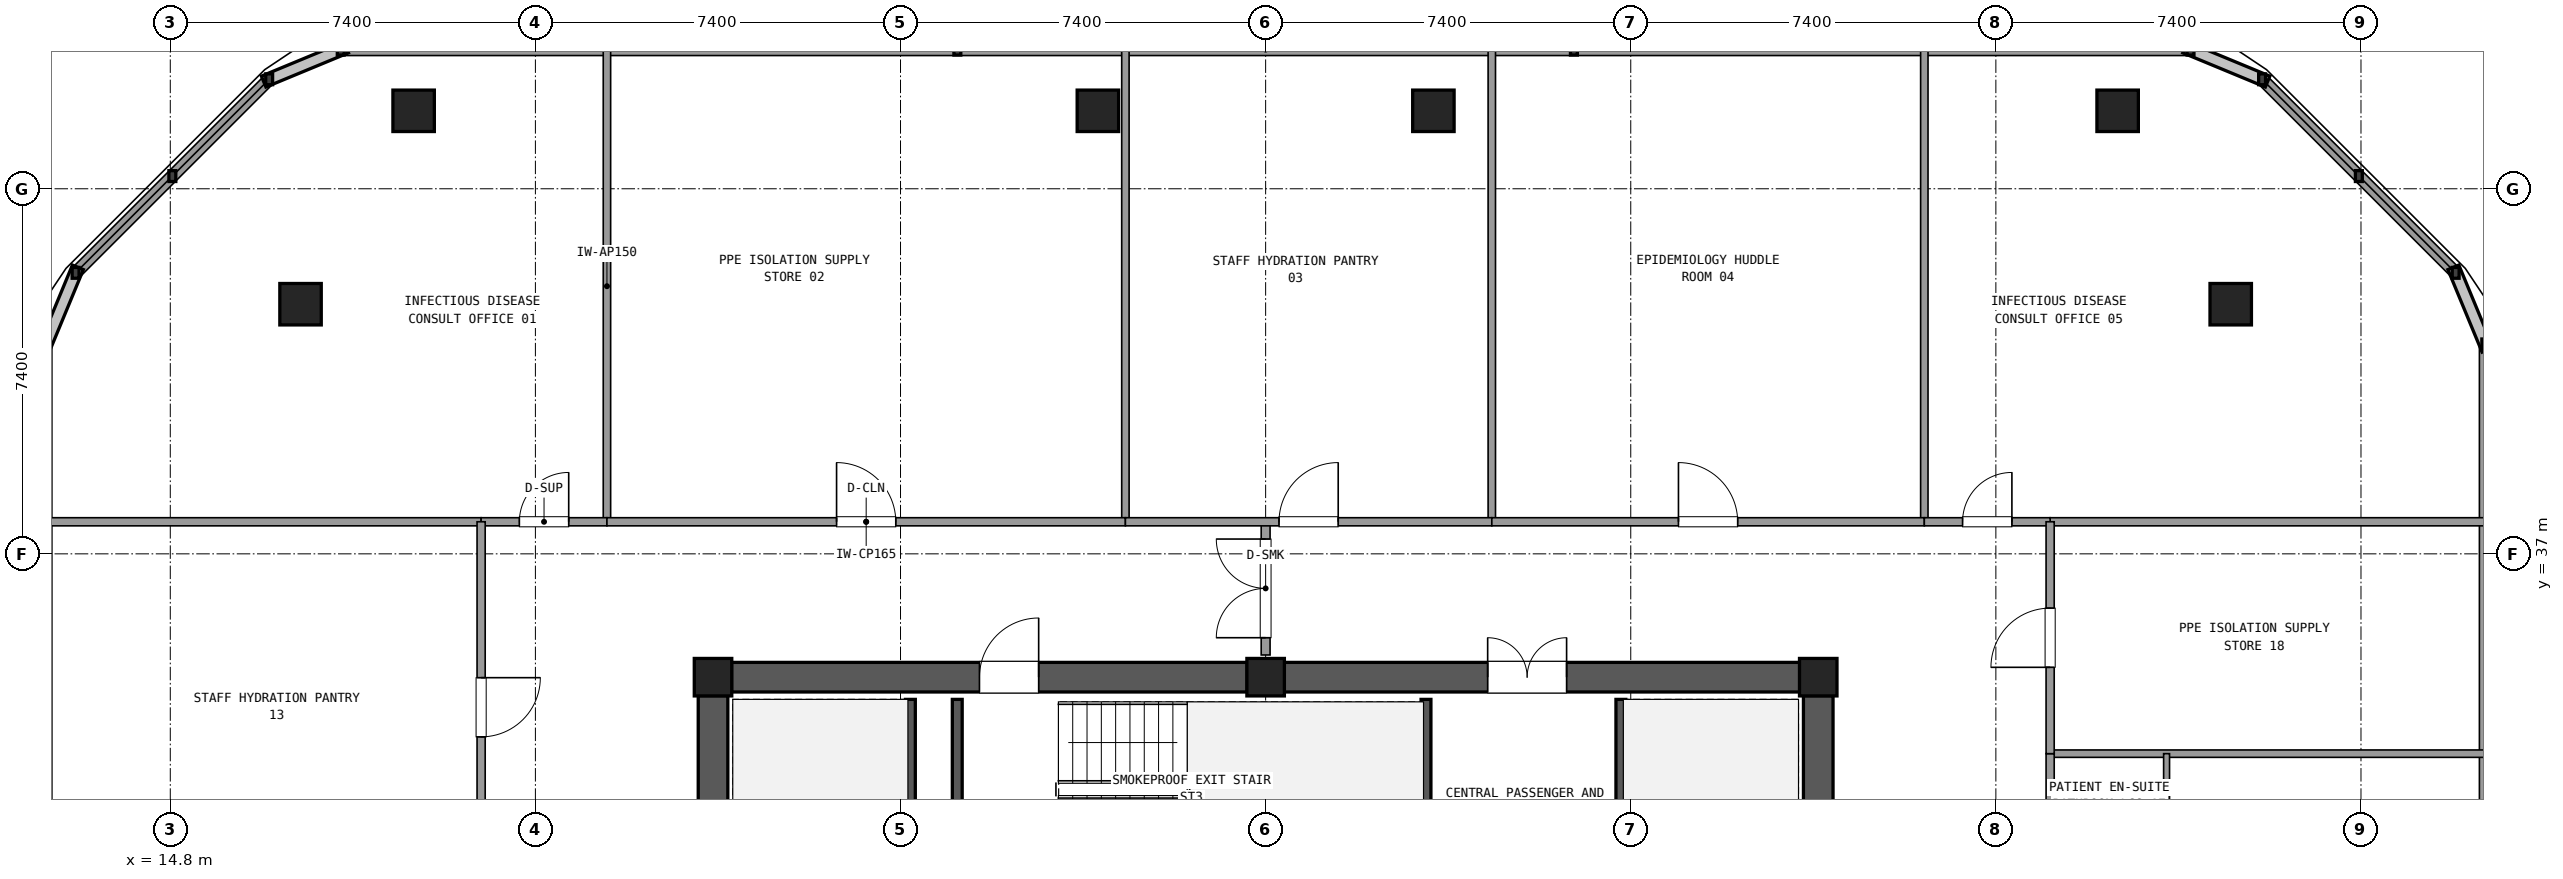
"""IFC4 building model, lengths in metres.
Left out: names, types, materials, properties, quantities, classifications, styles, units other than length and angle.
Written with IfcOpenShell. Run it as: python <this file> out.ifc"""

import sys

from ifc_helpers import new_model, si_unit, direction, frame, frame_2d, origin, origin_2d, place, context, subcontext, project, spatial, rectangle, extrude, element, fill, save


model = new_model("IFC4")
c1 = context("Model", 3, precision=1e-05, world=origin(), true_north=direction((0.0, 1.0)))
c2 = subcontext(c1, "Body", "Model", "MODEL_VIEW")
j1 = project(units=[si_unit("LENGTHUNIT", "METRE"), si_unit("PLANEANGLEUNIT", "RADIAN")], contexts=[c1])
p1 = place(None, origin())
s1 = spatial("IfcSite", under=j1, at=p1, CompositionType="ELEMENT")
p2 = place(p1, origin())
s2 = spatial("IfcBuilding", under=s1, at=p2, CompositionType="ELEMENT")
p3 = place(p2, frame((0.0, 0.0, 264.42)))
s3 = spatial("IfcBuildingStorey", under=s2, at=p3, CompositionType="ELEMENT", Elevation=264.42)
for number, where, z_axis, x_axis in (
    (1, (48.2, 34.5, 0.0), (0.0, 0.0, 1.0), (1.0, 0.0, 0.0)),
    (2, (37.0, 34.5, 0.0), (0.0, 0.0, 1.0), (1.0, 0.0, 0.0)),
    (3, (25.8, 34.5, 0.0), (0.0, 0.0, 1.0), (1.0, 0.0, 0.0)),
):
    element("IfcColumn", number, at=place(p3, frame(where, z_axis=z_axis, x_axis=x_axis)), inside=s3, PredefinedType="COLUMN", context=c2, shape_type="SweptSolid", body=[
        extrude(rectangle(XDim=0.76, YDim=0.76, at=origin_2d()), origin(), (0.0, 0.0, 1.0), 3.6),
    ])
p4 = place(p3, frame((48.2, 26.275, 0.0), z_axis=(0.0, 0.0, 1.0), x_axis=(0.0, 1.0, 0.0)))
e4 = element("IfcWall", 4, at=p4, inside=s3, PredefinedType="SHEAR", context=c2, shape_type="SweptSolid", body=[
    extrude(rectangle(XDim=7.85, YDim=0.6, at=frame_2d((3.925, 0.0))), origin(), (0.0, 0.0, 1.0), 3.32),
])
p5 = place(p3, frame((47.825, 34.5, 0.0), z_axis=(0.0, 0.0, 1.0), x_axis=(-1.0, 0.0, 0.0)))
e5 = element("IfcWall", 5, at=p5, inside=s3, PredefinedType="SHEAR", context=c2, shape_type="SweptSolid", body=[
    extrude(rectangle(XDim=10.45, YDim=0.6, at=frame_2d((5.225, 0.0))), origin(), (0.0, 0.0, 1.0), 3.32),
])
p6 = place(p5, frame((4.725, 0.0, 0.0)))
e6 = element("IfcOpeningElement", 6, at=p6, cuts=e5, PredefinedType="OPENING", context=c2, shape_type="SweptSolid", body=[
    extrude(rectangle(XDim=1.6, YDim=2.2, at=frame_2d((0.8, 1.1))), frame((0.0, 0.31, 0.0), z_axis=(0.0, -1.0, 0.0), x_axis=(1.0, 0.0, 0.0)), (0.0, 0.0, 1.0), 0.62),
])
p7 = place(p3, frame((36.625, 34.5, 0.0), z_axis=(0.0, 0.0, 1.0), x_axis=(-1.0, 0.0, 0.0)))
e7 = element("IfcWall", 7, at=p7, inside=s3, PredefinedType="SHEAR", context=c2, shape_type="SweptSolid", body=[
    extrude(rectangle(XDim=10.45, YDim=0.6, at=frame_2d((5.225, 0.0))), origin(), (0.0, 0.0, 1.0), 3.32),
])
p8 = place(p7, frame((4.225, 0.0, 0.0)))
e8 = element("IfcOpeningElement", 8, at=p8, cuts=e7, PredefinedType="OPENING", context=c2, shape_type="SweptSolid", body=[
    extrude(rectangle(XDim=1.2, YDim=2.15, at=frame_2d((0.6, 1.075))), frame((0.0, 0.31, 0.0), z_axis=(0.0, -1.0, 0.0), x_axis=(1.0, 0.0, 0.0)), (0.0, 0.0, 1.0), 0.62),
])
p9 = place(p3, frame((25.8, 34.125, 0.0), z_axis=(0.0, 0.0, 1.0), x_axis=(0.0, -1.0, 0.0)))
e9 = element("IfcWall", 9, at=p9, inside=s3, PredefinedType="SHEAR", context=c2, shape_type="SweptSolid", body=[
    extrude(rectangle(XDim=7.85, YDim=0.6, at=frame_2d((3.925, 0.0))), origin(), (0.0, 0.0, 1.0), 3.32),
])
for number, where, z_axis, x_axis in (
    (10, (56.56, 42.06, 0.0), (0.0, 0.0, 1.0), (1.0, 0.0, 0.0)),
    (11, (54.268, 45.98, 0.0), (0.0, 0.0, 1.0), (1.0, 0.0, 0.0)),
    (12, (40.4, 45.98, 0.0), (0.0, 0.0, 1.0), (1.0, 0.0, 0.0)),
    (13, (33.6, 45.98, 0.0), (0.0, 0.0, 1.0), (1.0, 0.0, 0.0)),
    (14, (19.732, 45.98, 0.0), (0.0, 0.0, 1.0), (1.0, 0.0, 0.0)),
    (15, (17.44, 42.06, 0.0), (0.0, 0.0, 1.0), (1.0, 0.0, 0.0)),
):
    element("IfcColumn", number, at=place(p3, frame(where, z_axis=z_axis, x_axis=x_axis)), inside=s3, PredefinedType="COLUMN", context=c2, shape_type="SweptSolid", body=[
        extrude(rectangle(XDim=0.84, YDim=0.84, at=origin_2d()), origin(), (0.0, 0.0, 1.0), 3.6),
    ])
p10 = place(p3, frame((61.72, 10.555, 0.0), z_axis=(0.0, 0.0, 1.0), x_axis=(0.0, 1.0, 0.0)))
e16 = element("IfcWall", 16, at=p10, inside=s3, PredefinedType="SOLIDWALL", context=c2, shape_type="SweptSolid", body=[
    extrude(rectangle(XDim=30.69, YDim=0.24, at=frame_2d((15.345, 0.0))), origin(), (0.0, 0.0, 1.0), 0.85),
])
p11 = place(p3, frame((61.119, 42.696, 0.0), z_axis=(0.0, 0.0, 1.0), x_axis=(-0.707106781187, 0.707106781187, 0.0)))
e17 = element("IfcWall", 17, at=p11, inside=s3, PredefinedType="SOLIDWALL", context=c2, shape_type="SweptSolid", body=[
    extrude(rectangle(XDim=5.548, YDim=0.24, at=frame_2d((2.774, 0.0))), origin(), (0.0, 0.0, 1.0), 0.85),
])
p12 = place(p3, frame((55.745, 47.22, 0.0), z_axis=(0.0, 0.0, 1.0), x_axis=(-1.0, 0.0, 0.0)))
e18 = element("IfcWall", 18, at=p12, inside=s3, PredefinedType="SOLIDWALL", context=c2, shape_type="SweptSolid", body=[
    extrude(rectangle(XDim=37.49, YDim=0.24, at=frame_2d((18.745, 0.0))), origin(), (0.0, 0.0, 1.0), 0.85),
])
p13 = place(p3, frame((16.804, 46.619, 0.0), z_axis=(0.0, 0.0, 1.0), x_axis=(-0.707106781187, -0.707106781187, 0.0)))
e19 = element("IfcWall", 19, at=p13, inside=s3, PredefinedType="SOLIDWALL", context=c2, shape_type="SweptSolid", body=[
    extrude(rectangle(XDim=5.548, YDim=0.24, at=frame_2d((2.774, 0.0))), origin(), (0.0, 0.0, 1.0), 0.85),
])
p14 = place(p3, frame((12.28, 41.245, 0.0), z_axis=(0.0, 0.0, 1.0), x_axis=(0.0, -1.0, 0.0)))
e20 = element("IfcWall", 20, at=p14, inside=s3, PredefinedType="SOLIDWALL", context=c2, shape_type="SweptSolid", body=[
    extrude(rectangle(XDim=13.805, YDim=0.24, at=frame_2d((6.903, 0.0))), origin(), (0.0, 0.0, 1.0), 0.85),
])
for number, where, z_axis, x_axis in (
    (21, (29.8, 24.65, 0.0), (0.0, 0.0, 1.0), (0.0, 1.0, 0.0)),
    (22, (44.2, 24.65, 0.0), (0.0, 0.0, 1.0), (0.0, 1.0, 0.0)),
):
    element("IfcWall", number, at=place(p3, frame(where, z_axis=z_axis, x_axis=x_axis)), inside=s3, PredefinedType="SHEAR", context=c2, shape_type="SweptSolid", body=[
        extrude(rectangle(XDim=9.4, YDim=0.2, at=frame_2d((4.7, 0.0))), origin(), (0.0, 0.0, 1.0), 3.32),
    ])
for number, where, z_axis, x_axis in (
    (23, (30.75, 30.36, 0.0), (0.0, 0.0, 1.0), (0.0, 1.0, 0.0)),
    (24, (40.25, 30.36, 0.0), (0.0, 0.0, 1.0), (0.0, 1.0, 0.0)),
):
    element("IfcWall", number, at=place(p3, frame(where, z_axis=z_axis, x_axis=x_axis)), inside=s3, PredefinedType="SHEAR", context=c2, shape_type="SweptSolid", body=[
        extrude(rectangle(XDim=3.69, YDim=0.2, at=frame_2d((1.845, 0.0))), origin(), (0.0, 0.0, 1.0), 3.32),
    ])
p15 = place(p3, frame((37.0, 34.95, 0.0), z_axis=(0.0, 0.0, 1.0), x_axis=(0.0, 1.0, 0.0)))
e25 = element("IfcWall", 25, at=p15, inside=s3, PredefinedType="PARTITIONING", context=c2, shape_type="SweptSolid", body=[
    extrude(rectangle(XDim=2.7, YDim=0.18, at=frame_2d((1.35, 0.0))), origin(), (0.0, 0.0, 1.0), 2.61),
])
p16 = place(p15, frame((0.35, 0.0, 0.0)))
e26 = element("IfcOpeningElement", 26, at=p16, cuts=e25, PredefinedType="OPENING", context=c2, shape_type="SweptSolid", body=[
    extrude(rectangle(XDim=2.0, YDim=2.2, at=frame_2d((1.0, 1.1))), frame((0.0, 0.1, 0.0), z_axis=(0.0, -1.0, 0.0), x_axis=(1.0, 0.0, 0.0)), (0.0, 0.0, 1.0), 0.2),
])
for number, where, z_axis, x_axis in (
    (27, (12.3, 37.65, 0.0), (0.0, 0.0, 1.0), (1.0, 0.0, 0.0)),
    (28, (52.9, 37.65, 0.0), (0.0, 0.0, 1.0), (1.0, 0.0, 0.0)),
):
    element("IfcWall", number, at=place(p3, frame(where, z_axis=z_axis, x_axis=x_axis)), inside=s3, PredefinedType="PARTITIONING", context=c2, shape_type="SweptSolid", body=[
        extrude(rectangle(XDim=8.8, YDim=0.165, at=frame_2d((4.4, 0.0))), origin(), (0.0, 0.0, 1.0), 2.61),
    ])
p17 = place(p3, frame((23.65, 37.65, 0.0), z_axis=(0.0, 0.0, 1.0), x_axis=(0.0, 1.0, 0.0)))
e29 = element("IfcWall", 29, at=p17, inside=s3, PredefinedType="PARTITIONING", context=c2, shape_type="SweptSolid", body=[
    extrude(rectangle(XDim=9.55, YDim=0.15, at=frame_2d((4.775, 0.0))), origin(), (0.0, 0.0, 1.0), 2.61),
])
p18 = place(p3, frame((21.1, 37.65, 0.0), z_axis=(0.0, 0.0, 1.0), x_axis=(1.0, 0.0, 0.0)))
e30 = element("IfcWall", 30, at=p18, inside=s3, PredefinedType="PARTITIONING", context=c2, shape_type="SweptSolid", body=[
    extrude(rectangle(XDim=2.55, YDim=0.165, at=frame_2d((1.275, 0.0))), origin(), (0.0, 0.0, 1.0), 2.61),
])
p19 = place(p18, frame((0.775, 0.0, 0.0)))
e31 = element("IfcOpeningElement", 31, at=p19, cuts=e30, PredefinedType="OPENING", context=c2, shape_type="SweptSolid", body=[
    extrude(rectangle(XDim=1.0, YDim=2.15, at=frame_2d((0.5, 1.075))), frame((0.0, 0.093, 0.0), z_axis=(0.0, -1.0, 0.0), x_axis=(1.0, 0.0, 0.0)), (0.0, 0.0, 1.0), 0.185),
])
p20 = place(p3, frame((34.158, 37.65, 0.0), z_axis=(0.0, 0.0, 1.0), x_axis=(0.0, 1.0, 0.0)))
e32 = element("IfcWall", 32, at=p20, inside=s3, PredefinedType="PARTITIONING", context=c2, shape_type="SweptSolid", body=[
    extrude(rectangle(XDim=9.55, YDim=0.15, at=frame_2d((4.775, 0.0))), origin(), (0.0, 0.0, 1.0), 2.61),
])
p21 = place(p3, frame((23.65, 37.65, 0.0), z_axis=(0.0, 0.0, 1.0), x_axis=(1.0, 0.0, 0.0)))
e33 = element("IfcWall", 33, at=p21, inside=s3, PredefinedType="PARTITIONING", context=c2, shape_type="SweptSolid", body=[
    extrude(rectangle(XDim=10.508, YDim=0.165, at=frame_2d((5.254, 0.0))), origin(), (0.0, 0.0, 1.0), 2.61),
])
p22 = place(p21, frame((4.654, 0.0, 0.0)))
e34 = element("IfcOpeningElement", 34, at=p22, cuts=e33, PredefinedType="OPENING", context=c2, shape_type="SweptSolid", body=[
    extrude(rectangle(XDim=1.2, YDim=2.15, at=frame_2d((0.6, 1.075))), frame((0.0, 0.093, 0.0), z_axis=(0.0, -1.0, 0.0), x_axis=(1.0, 0.0, 0.0)), (0.0, 0.0, 1.0), 0.185),
])
p23 = place(p3, frame((41.584, 37.65, 0.0), z_axis=(0.0, 0.0, 1.0), x_axis=(0.0, 1.0, 0.0)))
e35 = element("IfcWall", 35, at=p23, inside=s3, PredefinedType="PARTITIONING", context=c2, shape_type="SweptSolid", body=[
    extrude(rectangle(XDim=9.55, YDim=0.15, at=frame_2d((4.775, 0.0))), origin(), (0.0, 0.0, 1.0), 2.61),
])
p24 = place(p3, frame((34.158, 37.65, 0.0), z_axis=(0.0, 0.0, 1.0), x_axis=(1.0, 0.0, 0.0)))
e36 = element("IfcWall", 36, at=p24, inside=s3, PredefinedType="PARTITIONING", context=c2, shape_type="SweptSolid", body=[
    extrude(rectangle(XDim=7.426, YDim=0.165, at=frame_2d((3.713, 0.0))), origin(), (0.0, 0.0, 1.0), 2.61),
])
p25 = place(p24, frame((3.113, 0.0, 0.0)))
e37 = element("IfcOpeningElement", 37, at=p25, cuts=e36, PredefinedType="OPENING", context=c2, shape_type="SweptSolid", body=[
    extrude(rectangle(XDim=1.2, YDim=2.15, at=frame_2d((0.6, 1.075))), frame((0.0, 0.093, 0.0), z_axis=(0.0, -1.0, 0.0), x_axis=(1.0, 0.0, 0.0)), (0.0, 0.0, 1.0), 0.185),
])
p26 = place(p3, frame((50.35, 37.65, 0.0), z_axis=(0.0, 0.0, 1.0), x_axis=(0.0, 1.0, 0.0)))
e38 = element("IfcWall", 38, at=p26, inside=s3, PredefinedType="PARTITIONING", context=c2, shape_type="SweptSolid", body=[
    extrude(rectangle(XDim=9.55, YDim=0.15, at=frame_2d((4.775, 0.0))), origin(), (0.0, 0.0, 1.0), 2.61),
])
p27 = place(p3, frame((41.584, 37.65, 0.0), z_axis=(0.0, 0.0, 1.0), x_axis=(1.0, 0.0, 0.0)))
e39 = element("IfcWall", 39, at=p27, inside=s3, PredefinedType="PARTITIONING", context=c2, shape_type="SweptSolid", body=[
    extrude(rectangle(XDim=8.766, YDim=0.165, at=frame_2d((4.383, 0.0))), origin(), (0.0, 0.0, 1.0), 2.61),
])
p28 = place(p27, frame((3.783, 0.0, 0.0)))
e40 = element("IfcOpeningElement", 40, at=p28, cuts=e39, PredefinedType="OPENING", context=c2, shape_type="SweptSolid", body=[
    extrude(rectangle(XDim=1.2, YDim=2.15, at=frame_2d((0.6, 1.075))), frame((0.0, 0.093, 0.0), z_axis=(0.0, -1.0, 0.0), x_axis=(1.0, 0.0, 0.0)), (0.0, 0.0, 1.0), 0.185),
])
p29 = place(p3, frame((50.35, 37.65, 0.0), z_axis=(0.0, 0.0, 1.0), x_axis=(1.0, 0.0, 0.0)))
e41 = element("IfcWall", 41, at=p29, inside=s3, PredefinedType="PARTITIONING", context=c2, shape_type="SweptSolid", body=[
    extrude(rectangle(XDim=2.55, YDim=0.165, at=frame_2d((1.275, 0.0))), origin(), (0.0, 0.0, 1.0), 2.61),
])
p30 = place(p29, frame((0.775, 0.0, 0.0)))
e42 = element("IfcOpeningElement", 42, at=p30, cuts=e41, PredefinedType="OPENING", context=c2, shape_type="SweptSolid", body=[
    extrude(rectangle(XDim=1.0, YDim=2.15, at=frame_2d((0.5, 1.075))), frame((0.0, 0.093, 0.0), z_axis=(0.0, -1.0, 0.0), x_axis=(1.0, 0.0, 0.0)), (0.0, 0.0, 1.0), 0.185),
])
p31 = place(p3, frame((21.1, 30.13, 0.0), z_axis=(0.0, 0.0, 1.0), x_axis=(0.0, 1.0, 0.0)))
e43 = element("IfcWall", 43, at=p31, inside=s3, PredefinedType="PARTITIONING", context=c2, shape_type="SweptSolid", body=[
    extrude(rectangle(XDim=7.52, YDim=0.165, at=frame_2d((3.76, 0.0))), origin(), (0.0, 0.0, 1.0), 2.61),
])
p32 = place(p31, frame((3.16, 0.0, 0.0)))
e44 = element("IfcOpeningElement", 44, at=p32, cuts=e43, PredefinedType="OPENING", context=c2, shape_type="SweptSolid", body=[
    extrude(rectangle(XDim=1.2, YDim=2.15, at=frame_2d((0.6, 1.075))), frame((0.0, 0.093, 0.0), z_axis=(0.0, -1.0, 0.0), x_axis=(1.0, 0.0, 0.0)), (0.0, 0.0, 1.0), 0.185),
])
p33 = place(p3, frame((52.9, 32.95, 0.0), z_axis=(0.0, 0.0, 1.0), x_axis=(1.0, 0.0, 0.0)))
e45 = element("IfcWall", 45, at=p33, inside=s3, PredefinedType="PARTITIONING", context=c2, shape_type="SweptSolid", body=[
    extrude(rectangle(XDim=8.8, YDim=0.15, at=frame_2d((4.4, 0.0))), origin(), (0.0, 0.0, 1.0), 2.61),
])
p34 = place(p3, frame((52.9, 28.25, 0.0), z_axis=(0.0, 0.0, 1.0), x_axis=(0.0, 1.0, 0.0)))
e46 = element("IfcWall", 46, at=p34, inside=s3, PredefinedType="PARTITIONING", context=c2, shape_type="SweptSolid", body=[
    extrude(rectangle(XDim=4.7, YDim=0.165, at=frame_2d((2.35, 0.0))), origin(), (0.0, 0.0, 1.0), 2.61),
])
p35 = place(p34, frame((0.59, 0.0, 0.0)))
e47 = element("IfcOpeningElement", 47, at=p35, cuts=e46, PredefinedType="OPENING", context=c2, shape_type="SweptSolid", body=[
    extrude(rectangle(XDim=1.35, YDim=2.15, at=frame_2d((0.675, 1.075))), frame((0.0, 0.093, 0.0), z_axis=(0.0, -1.0, 0.0), x_axis=(1.0, 0.0, 0.0)), (0.0, 0.0, 1.0), 0.185),
])
p36 = place(p3, frame((55.26, 30.81, 0.0), z_axis=(0.0, 0.0, 1.0), x_axis=(0.0, 1.0, 0.0)))
e48 = element("IfcWall", 48, at=p36, inside=s3, PredefinedType="PLUMBINGWALL", context=c2, shape_type="SweptSolid", body=[
    extrude(rectangle(XDim=2.14, YDim=0.12, at=frame_2d((1.07, 0.0))), origin(), (0.0, 0.0, 1.0), 2.61),
])
p37 = place(p3, frame((52.9, 32.95, 0.0), z_axis=(0.0, 0.0, 1.0), x_axis=(0.0, 1.0, 0.0)))
e49 = element("IfcWall", 49, at=p37, inside=s3, PredefinedType="PARTITIONING", context=c2, shape_type="SweptSolid", body=[
    extrude(rectangle(XDim=4.7, YDim=0.165, at=frame_2d((2.35, 0.0))), origin(), (0.0, 0.0, 1.0), 2.61),
])
p38 = place(p37, frame((1.75, 0.0, 0.0)))
e50 = element("IfcOpeningElement", 50, at=p38, cuts=e49, PredefinedType="OPENING", context=c2, shape_type="SweptSolid", body=[
    extrude(rectangle(XDim=1.2, YDim=2.15, at=frame_2d((0.6, 1.075))), frame((0.0, 0.093, 0.0), z_axis=(0.0, -1.0, 0.0), x_axis=(1.0, 0.0, 0.0)), (0.0, 0.0, 1.0), 0.185),
])
p39 = place(p6, frame((1.6, 0.0, 0.0), z_axis=(0.0, 0.0, 1.0), x_axis=(-1.0, 0.0, 0.0)))
e51 = element("IfcDoor", 51, at=p39, inside=s3, OperationType="DOUBLE_DOOR_SINGLE_SWING", PredefinedType="DOOR", context=c2, shape_type="SweptSolid", body=[
    extrude(rectangle(XDim=1.6, YDim=2.2, at=frame_2d((0.8, 1.1))), frame((0.0, 0.025, 0.0), z_axis=(0.0, -1.0, 0.0), x_axis=(1.0, 0.0, 0.0)), (0.0, 0.0, 1.0), 0.05),
])
fill(e6, e51)
p40 = place(p8, frame((1.2, 0.0, 0.0), z_axis=(0.0, 0.0, 1.0), x_axis=(-1.0, 0.0, 0.0)))
e52 = element("IfcDoor", 52, at=p40, inside=s3, OperationType="SINGLE_SWING_LEFT", PredefinedType="DOOR", context=c2, shape_type="SweptSolid", body=[
    extrude(rectangle(XDim=1.2, YDim=2.15, at=frame_2d((0.6, 1.075))), frame((0.0, 0.025, 0.0), z_axis=(0.0, -1.0, 0.0), x_axis=(1.0, 0.0, 0.0)), (0.0, 0.0, 1.0), 0.05),
])
fill(e8, e52)
p41 = place(p16, origin())
e53 = element("IfcDoor", 53, at=p41, inside=s3, OperationType="DOUBLE_DOOR_SINGLE_SWING", PredefinedType="DOOR", context=c2, shape_type="SweptSolid", body=[
    extrude(rectangle(XDim=2.0, YDim=2.2, at=frame_2d((1.0, 1.1))), frame((0.0, 0.025, 0.0), z_axis=(0.0, -1.0, 0.0), x_axis=(1.0, 0.0, 0.0)), (0.0, 0.0, 1.0), 0.05),
])
fill(e26, e53)
p42 = place(p19, origin())
e54 = element("IfcDoor", 54, at=p42, inside=s3, OperationType="SINGLE_SWING_RIGHT", PredefinedType="DOOR", context=c2, shape_type="SweptSolid", body=[
    extrude(rectangle(XDim=1.0, YDim=2.15, at=frame_2d((0.5, 1.075))), frame((0.0, 0.025, 0.0), z_axis=(0.0, -1.0, 0.0), x_axis=(1.0, 0.0, 0.0)), (0.0, 0.0, 1.0), 0.05),
])
fill(e31, e54)
p43 = place(p22, origin())
e55 = element("IfcDoor", 55, at=p43, inside=s3, OperationType="SINGLE_SWING_LEFT", PredefinedType="DOOR", context=c2, shape_type="SweptSolid", body=[
    extrude(rectangle(XDim=1.2, YDim=2.15, at=frame_2d((0.6, 1.075))), frame((0.0, 0.025, 0.0), z_axis=(0.0, -1.0, 0.0), x_axis=(1.0, 0.0, 0.0)), (0.0, 0.0, 1.0), 0.05),
])
fill(e34, e55)
p44 = place(p25, origin())
e56 = element("IfcDoor", 56, at=p44, inside=s3, OperationType="SINGLE_SWING_RIGHT", PredefinedType="DOOR", context=c2, shape_type="SweptSolid", body=[
    extrude(rectangle(XDim=1.2, YDim=2.15, at=frame_2d((0.6, 1.075))), frame((0.0, 0.025, 0.0), z_axis=(0.0, -1.0, 0.0), x_axis=(1.0, 0.0, 0.0)), (0.0, 0.0, 1.0), 0.05),
])
fill(e37, e56)
p45 = place(p28, origin())
e57 = element("IfcDoor", 57, at=p45, inside=s3, OperationType="SINGLE_SWING_LEFT", PredefinedType="DOOR", context=c2, shape_type="SweptSolid", body=[
    extrude(rectangle(XDim=1.2, YDim=2.15, at=frame_2d((0.6, 1.075))), frame((0.0, 0.025, 0.0), z_axis=(0.0, -1.0, 0.0), x_axis=(1.0, 0.0, 0.0)), (0.0, 0.0, 1.0), 0.05),
])
fill(e40, e57)
p46 = place(p30, origin())
e58 = element("IfcDoor", 58, at=p46, inside=s3, OperationType="SINGLE_SWING_RIGHT", PredefinedType="DOOR", context=c2, shape_type="SweptSolid", body=[
    extrude(rectangle(XDim=1.0, YDim=2.15, at=frame_2d((0.5, 1.075))), frame((0.0, 0.025, 0.0), z_axis=(0.0, -1.0, 0.0), x_axis=(1.0, 0.0, 0.0)), (0.0, 0.0, 1.0), 0.05),
])
fill(e42, e58)
p47 = place(p32, frame((1.2, 0.0, 0.0), z_axis=(0.0, 0.0, 1.0), x_axis=(-1.0, 0.0, 0.0)))
e59 = element("IfcDoor", 59, at=p47, inside=s3, OperationType="SINGLE_SWING_RIGHT", PredefinedType="DOOR", context=c2, shape_type="SweptSolid", body=[
    extrude(rectangle(XDim=1.2, YDim=2.15, at=frame_2d((0.6, 1.075))), frame((0.0, 0.025, 0.0), z_axis=(0.0, -1.0, 0.0), x_axis=(1.0, 0.0, 0.0)), (0.0, 0.0, 1.0), 0.05),
])
fill(e44, e59)
p48 = place(p38, origin())
e60 = element("IfcDoor", 60, at=p48, inside=s3, OperationType="SINGLE_SWING_LEFT", PredefinedType="DOOR", context=c2, shape_type="SweptSolid", body=[
    extrude(rectangle(XDim=1.2, YDim=2.15, at=frame_2d((0.6, 1.075))), frame((0.0, 0.025, 0.0), z_axis=(0.0, -1.0, 0.0), x_axis=(1.0, 0.0, 0.0)), (0.0, 0.0, 1.0), 0.05),
])
fill(e50, e60)
save(model, sys.argv[1])
